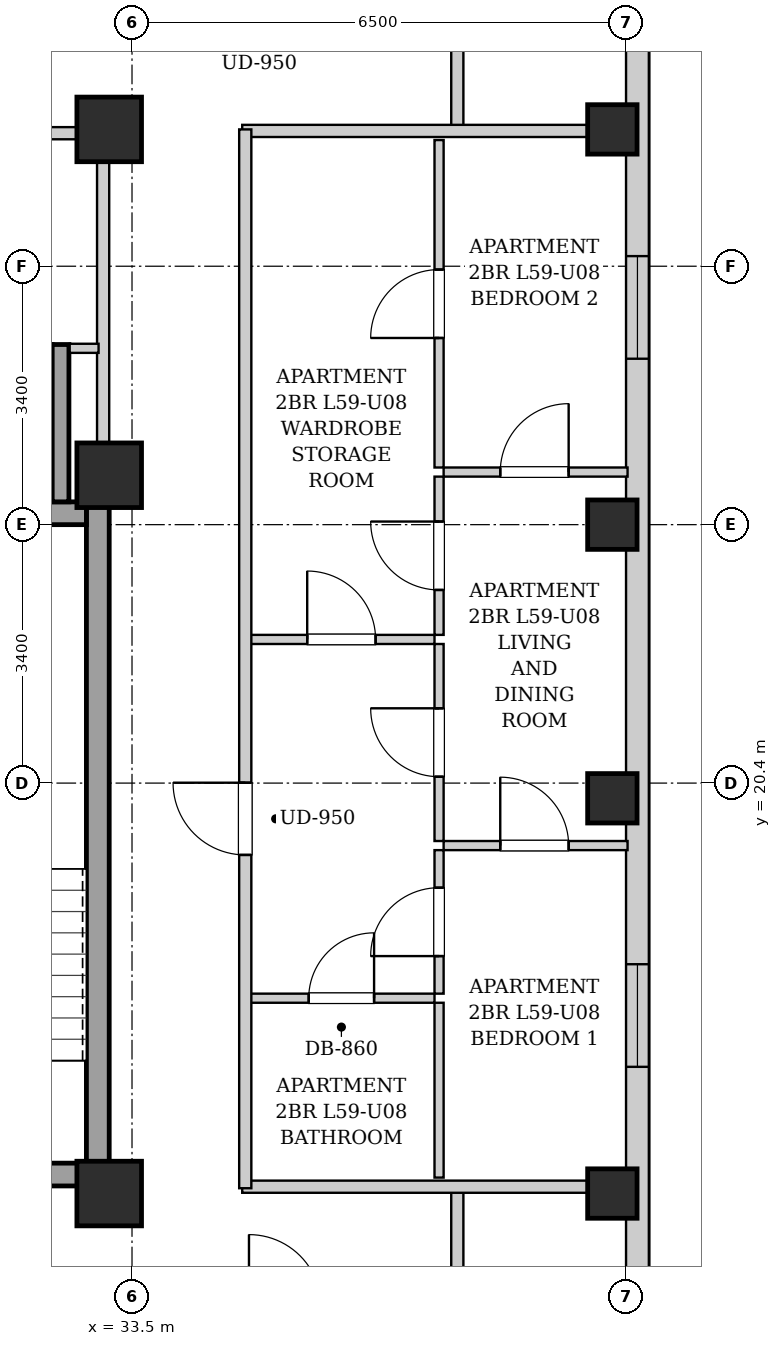
"""IFC4 building model, lengths in metres.
Left out: names, types, materials, properties, quantities, classifications, styles, units other than length and angle.
Written with IfcOpenShell. Run it as: python <this file> out.ifc"""

import sys

from ifc_helpers import new_model, si_unit, direction, frame, frame_2d, origin, origin_2d, place, context, subcontext, project, spatial, rectangle, extrude, element, fill, save


model = new_model("IFC4")
c1 = context("Model", 3, precision=1e-05, world=origin(), true_north=direction((0.0, 1.0)))
c2 = subcontext(c1, "Body", "Model", "MODEL_VIEW")
j1 = project(units=[si_unit("LENGTHUNIT", "METRE"), si_unit("PLANEANGLEUNIT", "RADIAN")], contexts=[c1])
p1 = place(None, origin())
s1 = spatial("IfcSite", under=j1, at=p1, CompositionType="ELEMENT")
p2 = place(p1, origin())
s2 = spatial("IfcBuilding", under=s1, at=p2, CompositionType="ELEMENT")
p3 = place(p2, frame((0.0, 0.0, 204.1)))
s3 = spatial("IfcBuildingStorey", under=s2, at=p3, CompositionType="ELEMENT", Elevation=204.1)
for number, where, z_axis, x_axis in (
    (1, (39.82, 15.0, 0.0), (0.0, 0.0, 1.0), (1.0, 0.0, 0.0)),
    (2, (39.82, 20.2, 0.0), (0.0, 0.0, 1.0), (1.0, 0.0, 0.0)),
    (3, (39.82, 23.8, 0.0), (0.0, 0.0, 1.0), (1.0, 0.0, 0.0)),
    (4, (39.82, 29.0, 0.0), (0.0, 0.0, 1.0), (1.0, 0.0, 0.0)),
):
    element("IfcColumn", number, at=place(p3, frame(where, z_axis=z_axis, x_axis=x_axis)), inside=s3, PredefinedType="COLUMN", context=c2, shape_type="SweptSolid", body=[
        extrude(rectangle(XDim=0.65, YDim=0.65, at=origin_2d()), origin(), (0.0, 0.0, 1.0), 3.3),
    ])
for number, where, z_axis, x_axis in (
    (5, (33.2, 15.0, 0.0), (0.0, 0.0, 1.0), (1.0, 0.0, 0.0)),
    (6, (33.2, 29.0, 0.0), (0.0, 0.0, 1.0), (1.0, 0.0, 0.0)),
    (7, (33.2, 24.45, 0.0), (0.0, 0.0, 1.0), (1.0, 0.0, 0.0)),
):
    element("IfcColumn", number, at=place(p3, frame(where, z_axis=z_axis, x_axis=x_axis)), inside=s3, PredefinedType="COLUMN", context=c2, shape_type="SweptSolid", body=[
        extrude(rectangle(XDim=0.85, YDim=0.85, at=origin_2d()), origin(), (0.0, 0.0, 1.0), 3.3),
    ])
p4 = place(p3, frame((40.15, 37.7, 0.0), z_axis=(0.0, 0.0, 1.0), x_axis=(0.0, -1.0, 0.0)))
e8 = element("IfcWall", 8, at=p4, inside=s3, PredefinedType="SOLIDWALL", context=c2, shape_type="SweptSolid", body=[
    extrude(rectangle(XDim=31.4, YDim=0.3, at=frame_2d((15.7, 0.0))), origin(), (0.0, 0.0, 1.0), 3.04),
])
p5 = place(p4, frame((1.504, 0.0, 0.55)))
e9 = element("IfcOpeningElement", 9, at=p5, cuts=e8, PredefinedType="OPENING", context=c2, shape_type="SweptSolid", body=[
    extrude(rectangle(XDim=1.35, YDim=1.2, at=frame_2d((0.675, 0.6))), frame((0.0, 0.16, 0.0), z_axis=(0.0, -1.0, 0.0), x_axis=(1.0, 0.0, 0.0)), (0.0, 0.0, 1.0), 0.32),
])
p6 = place(p4, frame((19.683, 0.0, 0.55)))
e10 = element("IfcOpeningElement", 10, at=p6, cuts=e8, PredefinedType="OPENING", context=c2, shape_type="SweptSolid", body=[
    extrude(rectangle(XDim=1.35, YDim=1.2, at=frame_2d((0.675, 0.6))), frame((0.0, 0.16, 0.0), z_axis=(0.0, -1.0, 0.0), x_axis=(1.0, 0.0, 0.0)), (0.0, 0.0, 1.0), 0.32),
])
p7 = place(p4, frame((10.367, 0.0, 0.55)))
e11 = element("IfcOpeningElement", 11, at=p7, cuts=e8, PredefinedType="OPENING", context=c2, shape_type="SweptSolid", body=[
    extrude(rectangle(XDim=1.35, YDim=1.2, at=frame_2d((0.675, 0.6))), frame((0.0, 0.16, 0.0), z_axis=(0.0, -1.0, 0.0), x_axis=(1.0, 0.0, 0.0)), (0.0, 0.0, 1.0), 0.32),
])
p8 = place(p3, frame((33.05, 15.1, 0.0), z_axis=(0.0, 0.0, 1.0), x_axis=(0.0, 1.0, 0.0)))
e12 = element("IfcWall", 12, at=p8, inside=s3, PredefinedType="SHEAR", context=c2, shape_type="SweptSolid", body=[
    extrude(rectangle(XDim=9.0, YDim=0.3, at=frame_2d((4.5, 0.0))), origin(), (0.0, 0.0, 1.0), 3.04),
])
p9 = place(p3, frame((30.05, 23.95, 0.0), z_axis=(0.0, 0.0, 1.0), x_axis=(1.0, 0.0, 0.0)))
e13 = element("IfcWall", 13, at=p9, inside=s3, PredefinedType="SHEAR", context=c2, shape_type="SweptSolid", body=[
    extrude(rectangle(XDim=2.85, YDim=0.3, at=frame_2d((1.425, 0.0))), origin(), (0.0, 0.0, 1.0), 3.04),
])
p10 = place(p3, frame((30.05, 15.25, 0.0), z_axis=(0.0, 0.0, 1.0), x_axis=(1.0, 0.0, 0.0)))
e14 = element("IfcWall", 14, at=p10, inside=s3, PredefinedType="SHEAR", context=c2, shape_type="SweptSolid", body=[
    extrude(rectangle(XDim=2.85, YDim=0.3, at=frame_2d((1.425, 0.0))), origin(), (0.0, 0.0, 1.0), 3.04),
])
p11 = place(p10, frame((0.86, 0.0, 0.0)))
e15 = element("IfcOpeningElement", 15, at=p11, cuts=e14, PredefinedType="OPENING", context=c2, shape_type="SweptSolid", body=[
    extrude(rectangle(XDim=1.1, YDim=2.05, at=frame_2d((0.55, 1.025))), frame((0.0, 0.16, 0.0), z_axis=(0.0, -1.0, 0.0), x_axis=(1.0, 0.0, 0.0)), (0.0, 0.0, 1.0), 0.32),
])
p12 = place(p3, frame((32.56, 24.1, 0.0), z_axis=(0.0, 0.0, 1.0), x_axis=(0.0, 1.0, 0.0)))
e16 = element("IfcWall", 16, at=p12, inside=s3, PredefinedType="SHEAR", context=c2, shape_type="SweptSolid", body=[
    extrude(rectangle(XDim=2.07, YDim=0.22, at=frame_2d((1.035, 0.0))), origin(), (0.0, 0.0, 1.0), 3.04),
])
p13 = place(p3, frame((33.12, 24.12, 0.0), z_axis=(0.0, 0.0, 1.0), x_axis=(0.0, 1.0, 0.0)))
e17 = element("IfcWall", 17, at=p13, inside=s3, PredefinedType="PARTITIONING", context=c2, shape_type="SweptSolid", body=[
    extrude(rectangle(XDim=4.76, YDim=0.16, at=frame_2d((2.38, 0.0))), origin(), (0.0, 0.0, 1.0), 3.04),
])
p14 = place(p3, frame((32.68, 26.12, 0.0), z_axis=(0.0, 0.0, 1.0), x_axis=(1.0, 0.0, 0.0)))
e18 = element("IfcWall", 18, at=p14, inside=s3, PredefinedType="PARTITIONING", context=c2, shape_type="SweptSolid", body=[
    extrude(rectangle(XDim=0.38, YDim=0.12, at=frame_2d((0.19, 0.0))), origin(), (0.0, 0.0, 1.0), 3.04),
])
p15 = place(p3, frame((30.08, 28.95, 0.0), z_axis=(0.0, 0.0, 1.0), x_axis=(1.0, 0.0, 0.0)))
e19 = element("IfcWall", 19, at=p15, inside=s3, PredefinedType="PARTITIONING", context=c2, shape_type="SweptSolid", body=[
    extrude(rectangle(XDim=2.96, YDim=0.16, at=frame_2d((1.48, 0.0))), origin(), (0.0, 0.0, 1.0), 3.04),
])
p16 = place(p15, frame((1.045, 0.0, 0.0)))
e20 = element("IfcOpeningElement", 20, at=p16, cuts=e19, PredefinedType="OPENING", context=c2, shape_type="SweptSolid", body=[
    extrude(rectangle(XDim=0.86, YDim=2.05, at=frame_2d((0.43, 1.025))), frame((0.0, 0.09, 0.0), z_axis=(0.0, -1.0, 0.0), x_axis=(1.0, 0.0, 0.0)), (0.0, 0.0, 1.0), 0.18),
])
for number, where, z_axis, x_axis in (
    (21, (37.78, 13.51, 0.0), (0.0, 0.0, 1.0), (0.0, 1.0, 0.0)),
    (22, (37.78, 28.98, 0.0), (0.0, 0.0, 1.0), (0.0, 1.0, 0.0)),
):
    element("IfcWall", number, at=place(p3, frame(where, z_axis=z_axis, x_axis=x_axis)), inside=s3, PredefinedType="PARTITIONING", context=c2, shape_type="SweptSolid", body=[
        extrude(rectangle(XDim=1.58, YDim=0.16, at=frame_2d((0.79, 0.0))), origin(), (0.0, 0.0, 1.0), 3.04),
    ])
for number, where, z_axis, x_axis in (
    (23, (34.95, 15.09, 0.0), (0.0, 0.0, 1.0), (1.0, 0.0, 0.0)),
    (24, (34.95, 28.98, 0.0), (0.0, 0.0, 1.0), (1.0, 0.0, 0.0)),
):
    element("IfcWall", number, at=place(p3, frame(where, z_axis=z_axis, x_axis=x_axis)), inside=s3, PredefinedType="PARTITIONING", context=c2, shape_type="SweptSolid", body=[
        extrude(rectangle(XDim=5.07, YDim=0.16, at=frame_2d((2.535, 0.0))), origin(), (0.0, 0.0, 1.0), 2.556),
    ])
p17 = place(p3, frame((35.03, 22.29, 0.0), z_axis=(0.0, 0.0, 1.0), x_axis=(1.0, 0.0, 0.0)))
e25 = element("IfcWall", 25, at=p17, inside=s3, PredefinedType="PARTITIONING", context=c2, shape_type="SweptSolid", body=[
    extrude(rectangle(XDim=2.45, YDim=0.12, at=frame_2d((1.225, 0.0))), origin(), (0.0, 0.0, 1.0), 3.04),
])
p18 = place(p17, frame((0.775, 0.0, 0.0)))
e26 = element("IfcOpeningElement", 26, at=p18, cuts=e25, PredefinedType="OPENING", context=c2, shape_type="SweptSolid", body=[
    extrude(rectangle(XDim=0.9, YDim=2.05, at=frame_2d((0.45, 1.025))), frame((0.0, 0.07, 0.0), z_axis=(0.0, -1.0, 0.0), x_axis=(1.0, 0.0, 0.0)), (0.0, 0.0, 1.0), 0.14),
])
p19 = place(p3, frame((37.54, 22.35, 0.0), z_axis=(0.0, 0.0, 1.0), x_axis=(0.0, 1.0, 0.0)))
e27 = element("IfcWall", 27, at=p19, inside=s3, PredefinedType="PARTITIONING", context=c2, shape_type="SweptSolid", body=[
    extrude(rectangle(XDim=2.082, YDim=0.12, at=frame_2d((1.041, 0.0))), origin(), (0.0, 0.0, 1.0), 3.04),
])
p20 = place(p19, frame((0.591, 0.0, 0.0)))
e28 = element("IfcOpeningElement", 28, at=p20, cuts=e27, PredefinedType="OPENING", context=c2, shape_type="SweptSolid", body=[
    extrude(rectangle(XDim=0.9, YDim=2.05, at=frame_2d((0.45, 1.025))), frame((0.0, 0.07, 0.0), z_axis=(0.0, -1.0, 0.0), x_axis=(1.0, 0.0, 0.0)), (0.0, 0.0, 1.0), 0.14),
])
p21 = place(p3, frame((37.54, 24.552, 0.0), z_axis=(0.0, 0.0, 1.0), x_axis=(0.0, 1.0, 0.0)))
e29 = element("IfcWall", 29, at=p21, inside=s3, PredefinedType="PARTITIONING", context=c2, shape_type="SweptSolid", body=[
    extrude(rectangle(XDim=4.308, YDim=0.12, at=frame_2d((2.154, 0.0))), origin(), (0.0, 0.0, 1.0), 3.04),
])
p22 = place(p21, frame((1.704, 0.0, 0.0)))
e30 = element("IfcOpeningElement", 30, at=p22, cuts=e29, PredefinedType="OPENING", context=c2, shape_type="SweptSolid", body=[
    extrude(rectangle(XDim=0.9, YDim=2.05, at=frame_2d((0.45, 1.025))), frame((0.0, 0.07, 0.0), z_axis=(0.0, -1.0, 0.0), x_axis=(1.0, 0.0, 0.0)), (0.0, 0.0, 1.0), 0.14),
])
p23 = place(p3, frame((35.03, 17.57, 0.0), z_axis=(0.0, 0.0, 1.0), x_axis=(1.0, 0.0, 0.0)))
e31 = element("IfcWall", 31, at=p23, inside=s3, PredefinedType="PARTITIONING", context=c2, shape_type="SweptSolid", body=[
    extrude(rectangle(XDim=2.45, YDim=0.12, at=frame_2d((1.225, 0.0))), origin(), (0.0, 0.0, 1.0), 3.04),
])
p24 = place(p23, frame((0.795, 0.0, 0.0)))
e32 = element("IfcOpeningElement", 32, at=p24, cuts=e31, PredefinedType="OPENING", context=c2, shape_type="SweptSolid", body=[
    extrude(rectangle(XDim=0.86, YDim=2.05, at=frame_2d((0.43, 1.025))), frame((0.0, 0.07, 0.0), z_axis=(0.0, -1.0, 0.0), x_axis=(1.0, 0.0, 0.0)), (0.0, 0.0, 1.0), 0.14),
])
p25 = place(p3, frame((37.54, 15.21, 0.0), z_axis=(0.0, 0.0, 1.0), x_axis=(0.0, 1.0, 0.0)))
e33 = element("IfcWall", 33, at=p25, inside=s3, PredefinedType="PARTITIONING", context=c2, shape_type="SweptSolid", body=[
    extrude(rectangle(XDim=2.3, YDim=0.12, at=frame_2d((1.15, 0.0))), origin(), (0.0, 0.0, 1.0), 3.04),
])
p26 = place(p3, frame((37.54, 17.63, 0.0), z_axis=(0.0, 0.0, 1.0), x_axis=(0.0, 1.0, 0.0)))
e34 = element("IfcWall", 34, at=p26, inside=s3, PredefinedType="PARTITIONING", context=c2, shape_type="SweptSolid", body=[
    extrude(rectangle(XDim=1.888, YDim=0.12, at=frame_2d((0.944, 0.0))), origin(), (0.0, 0.0, 1.0), 3.04),
])
p27 = place(p26, frame((0.494, 0.0, 0.0)))
e35 = element("IfcOpeningElement", 35, at=p27, cuts=e34, PredefinedType="OPENING", context=c2, shape_type="SweptSolid", body=[
    extrude(rectangle(XDim=0.9, YDim=2.05, at=frame_2d((0.45, 1.025))), frame((0.0, 0.07, 0.0), z_axis=(0.0, -1.0, 0.0), x_axis=(1.0, 0.0, 0.0)), (0.0, 0.0, 1.0), 0.14),
])
p28 = place(p3, frame((37.54, 19.638, 0.0), z_axis=(0.0, 0.0, 1.0), x_axis=(0.0, 1.0, 0.0)))
e36 = element("IfcWall", 36, at=p28, inside=s3, PredefinedType="PARTITIONING", context=c2, shape_type="SweptSolid", body=[
    extrude(rectangle(XDim=2.592, YDim=0.12, at=frame_2d((1.296, 0.0))), origin(), (0.0, 0.0, 1.0), 3.04),
])
p29 = place(p28, frame((0.846, 0.0, 0.0)))
e37 = element("IfcOpeningElement", 37, at=p29, cuts=e36, PredefinedType="OPENING", context=c2, shape_type="SweptSolid", body=[
    extrude(rectangle(XDim=0.9, YDim=2.05, at=frame_2d((0.45, 1.025))), frame((0.0, 0.07, 0.0), z_axis=(0.0, -1.0, 0.0), x_axis=(1.0, 0.0, 0.0)), (0.0, 0.0, 1.0), 0.14),
])
p30 = place(p3, frame((37.6, 19.578, 0.0), z_axis=(0.0, 0.0, 1.0), x_axis=(1.0, 0.0, 0.0)))
e38 = element("IfcWall", 38, at=p30, inside=s3, PredefinedType="PARTITIONING", context=c2, shape_type="SweptSolid", body=[
    extrude(rectangle(XDim=2.42, YDim=0.12, at=frame_2d((1.21, 0.0))), origin(), (0.0, 0.0, 1.0), 3.04),
])
p31 = place(p30, frame((0.745, 0.0, 0.0)))
e39 = element("IfcOpeningElement", 39, at=p31, cuts=e38, PredefinedType="OPENING", context=c2, shape_type="SweptSolid", body=[
    extrude(rectangle(XDim=0.9, YDim=2.05, at=frame_2d((0.45, 1.025))), frame((0.0, 0.07, 0.0), z_axis=(0.0, -1.0, 0.0), x_axis=(1.0, 0.0, 0.0)), (0.0, 0.0, 1.0), 0.14),
])
p32 = place(p3, frame((37.6, 24.492, 0.0), z_axis=(0.0, 0.0, 1.0), x_axis=(1.0, 0.0, 0.0)))
e40 = element("IfcWall", 40, at=p32, inside=s3, PredefinedType="PARTITIONING", context=c2, shape_type="SweptSolid", body=[
    extrude(rectangle(XDim=2.42, YDim=0.12, at=frame_2d((1.21, 0.0))), origin(), (0.0, 0.0, 1.0), 2.722),
])
p33 = place(p32, frame((0.745, 0.0, 0.0)))
e41 = element("IfcOpeningElement", 41, at=p33, cuts=e40, PredefinedType="OPENING", context=c2, shape_type="SweptSolid", body=[
    extrude(rectangle(XDim=0.9, YDim=2.05, at=frame_2d((0.45, 1.025))), frame((0.0, 0.07, 0.0), z_axis=(0.0, -1.0, 0.0), x_axis=(1.0, 0.0, 0.0)), (0.0, 0.0, 1.0), 0.14),
])
p34 = place(p3, frame((34.99, 15.07, 0.0), z_axis=(0.0, 0.0, 1.0), x_axis=(0.0, 1.0, 0.0)))
e42 = element("IfcWall", 42, at=p34, inside=s3, PredefinedType="PARTITIONING", context=c2, shape_type="SweptSolid", body=[
    extrude(rectangle(XDim=13.93, YDim=0.16, at=frame_2d((6.965, 0.0))), origin(), (0.0, 0.0, 1.0), 3.04),
])
p35 = place(p34, frame((4.385, 0.0, 0.0)))
e43 = element("IfcOpeningElement", 43, at=p35, cuts=e42, PredefinedType="OPENING", context=c2, shape_type="SweptSolid", body=[
    extrude(rectangle(XDim=0.95, YDim=2.1, at=frame_2d((0.475, 1.05))), frame((0.0, 0.09, 0.0), z_axis=(0.0, -1.0, 0.0), x_axis=(1.0, 0.0, 0.0)), (0.0, 0.0, 1.0), 0.18),
])
p36 = place(p18, origin())
e44 = element("IfcDoor", 44, at=p36, inside=s3, OperationType="SINGLE_SWING_LEFT", PredefinedType="DOOR", context=c2, shape_type="SweptSolid", body=[
    extrude(rectangle(XDim=0.9, YDim=2.05, at=frame_2d((0.45, 1.025))), frame((0.0, 0.025, 0.0), z_axis=(0.0, -1.0, 0.0), x_axis=(1.0, 0.0, 0.0)), (0.0, 0.0, 1.0), 0.05),
])
fill(e26, e44)
p37 = place(p20, origin())
e45 = element("IfcDoor", 45, at=p37, inside=s3, OperationType="SINGLE_SWING_RIGHT", PredefinedType="DOOR", context=c2, shape_type="SweptSolid", body=[
    extrude(rectangle(XDim=0.9, YDim=2.05, at=frame_2d((0.45, 1.025))), frame((0.0, 0.025, 0.0), z_axis=(0.0, -1.0, 0.0), x_axis=(1.0, 0.0, 0.0)), (0.0, 0.0, 1.0), 0.05),
])
fill(e28, e45)
p38 = place(p22, origin())
e46 = element("IfcDoor", 46, at=p38, inside=s3, OperationType="SINGLE_SWING_LEFT", PredefinedType="DOOR", context=c2, shape_type="SweptSolid", body=[
    extrude(rectangle(XDim=0.9, YDim=2.05, at=frame_2d((0.45, 1.025))), frame((0.0, 0.025, 0.0), z_axis=(0.0, -1.0, 0.0), x_axis=(1.0, 0.0, 0.0)), (0.0, 0.0, 1.0), 0.05),
])
fill(e30, e46)
p39 = place(p24, origin())
e47 = element("IfcDoor", 47, at=p39, inside=s3, OperationType="SINGLE_SWING_RIGHT", PredefinedType="DOOR", context=c2, shape_type="SweptSolid", body=[
    extrude(rectangle(XDim=0.86, YDim=2.05, at=frame_2d((0.43, 1.025))), frame((0.0, 0.025, 0.0), z_axis=(0.0, -1.0, 0.0), x_axis=(1.0, 0.0, 0.0)), (0.0, 0.0, 1.0), 0.05),
])
fill(e32, e47)
p40 = place(p27, origin())
e48 = element("IfcDoor", 48, at=p40, inside=s3, OperationType="SINGLE_SWING_LEFT", PredefinedType="DOOR", context=c2, shape_type="SweptSolid", body=[
    extrude(rectangle(XDim=0.9, YDim=2.05, at=frame_2d((0.45, 1.025))), frame((0.0, 0.025, 0.0), z_axis=(0.0, -1.0, 0.0), x_axis=(1.0, 0.0, 0.0)), (0.0, 0.0, 1.0), 0.05),
])
fill(e35, e48)
p41 = place(p29, origin())
e49 = element("IfcDoor", 49, at=p41, inside=s3, OperationType="SINGLE_SWING_RIGHT", PredefinedType="DOOR", context=c2, shape_type="SweptSolid", body=[
    extrude(rectangle(XDim=0.9, YDim=2.05, at=frame_2d((0.45, 1.025))), frame((0.0, 0.025, 0.0), z_axis=(0.0, -1.0, 0.0), x_axis=(1.0, 0.0, 0.0)), (0.0, 0.0, 1.0), 0.05),
])
fill(e37, e49)
p42 = place(p31, origin())
e50 = element("IfcDoor", 50, at=p42, inside=s3, OperationType="SINGLE_SWING_LEFT", PredefinedType="DOOR", context=c2, shape_type="SweptSolid", body=[
    extrude(rectangle(XDim=0.9, YDim=2.05, at=frame_2d((0.45, 1.025))), frame((0.0, 0.025, 0.0), z_axis=(0.0, -1.0, 0.0), x_axis=(1.0, 0.0, 0.0)), (0.0, 0.0, 1.0), 0.05),
])
fill(e39, e50)
p43 = place(p33, origin())
e51 = element("IfcDoor", 51, at=p43, inside=s3, OperationType="SINGLE_SWING_RIGHT", PredefinedType="DOOR", context=c2, shape_type="SweptSolid", body=[
    extrude(rectangle(XDim=0.9, YDim=2.05, at=frame_2d((0.45, 1.025))), frame((0.0, 0.025, 0.0), z_axis=(0.0, -1.0, 0.0), x_axis=(1.0, 0.0, 0.0)), (0.0, 0.0, 1.0), 0.05),
])
fill(e41, e51)
p44 = place(p35, origin())
e52 = element("IfcDoor", 52, at=p44, inside=s3, OperationType="SINGLE_SWING_RIGHT", PredefinedType="DOOR", context=c2, shape_type="SweptSolid", body=[
    extrude(rectangle(XDim=0.95, YDim=2.1, at=frame_2d((0.475, 1.05))), frame((0.0, 0.025, 0.0), z_axis=(0.0, -1.0, 0.0), x_axis=(1.0, 0.0, 0.0)), (0.0, 0.0, 1.0), 0.05),
])
fill(e43, e52)
p45 = place(p6, origin())
e53 = element("IfcWindow", 53, at=p45, inside=s3, PartitioningType="SINGLE_PANEL", PredefinedType="WINDOW", context=c2, shape_type="SweptSolid", body=[
    extrude(rectangle(XDim=1.35, YDim=1.2, at=frame_2d((0.675, 0.6))), frame((0.0, 0.03, 0.0), z_axis=(0.0, -1.0, 0.0), x_axis=(1.0, 0.0, 0.0)), (0.0, 0.0, 1.0), 0.06),
])
fill(e10, e53)
p46 = place(p7, origin())
e54 = element("IfcWindow", 54, at=p46, inside=s3, PartitioningType="SINGLE_PANEL", PredefinedType="WINDOW", context=c2, shape_type="SweptSolid", body=[
    extrude(rectangle(XDim=1.35, YDim=1.2, at=frame_2d((0.675, 0.6))), frame((0.0, 0.03, 0.0), z_axis=(0.0, -1.0, 0.0), x_axis=(1.0, 0.0, 0.0)), (0.0, 0.0, 1.0), 0.06),
])
fill(e11, e54)
save(model, sys.argv[1])
